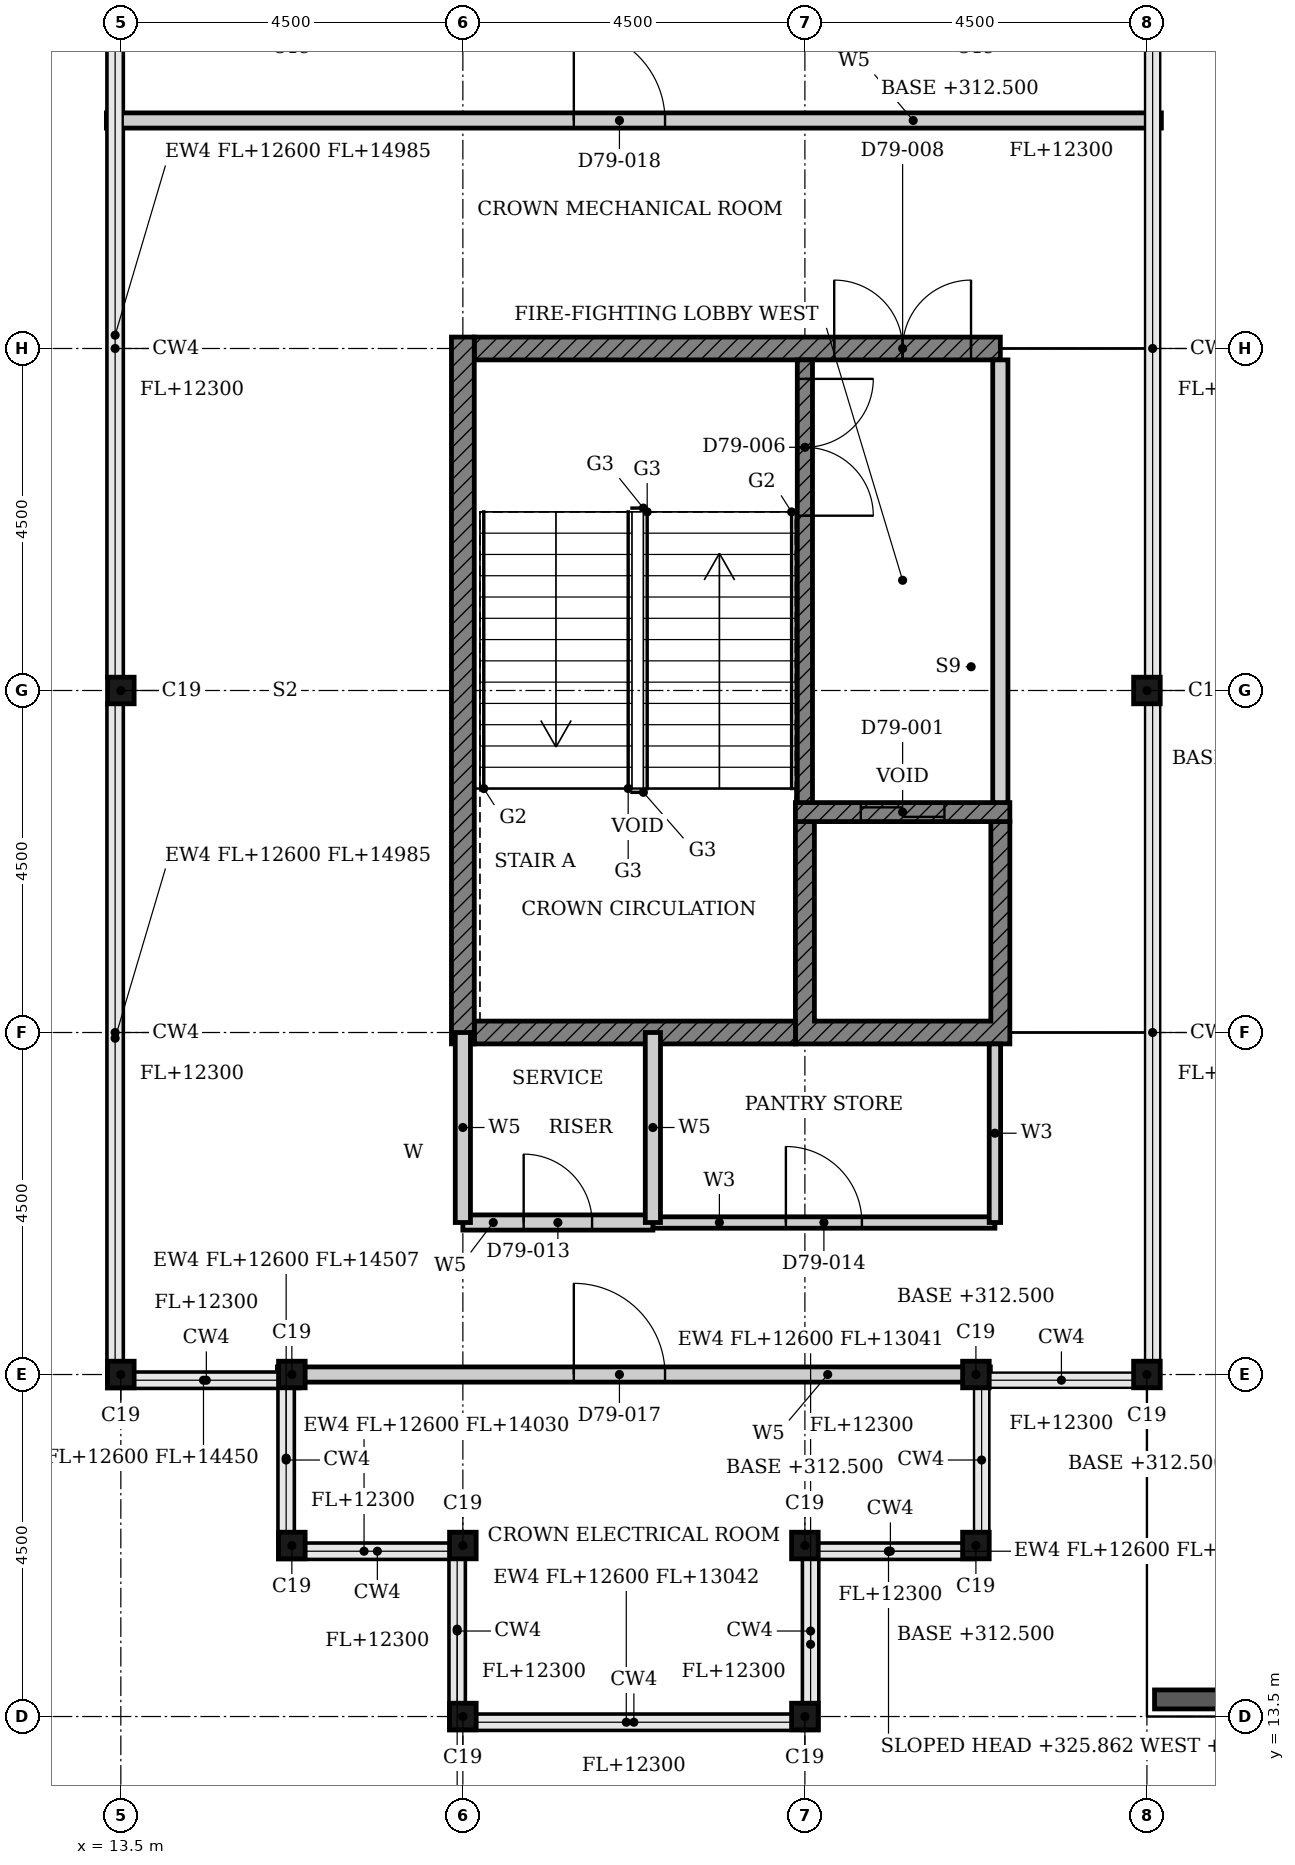
"""IFC4 building model, lengths in metres.
Left out: names, types, materials, properties, quantities, classifications, styles, units other than length and angle.
Written with IfcOpenShell. Run it as: python <this file> out.ifc"""

import sys

from ifc_helpers import new_model, si_unit, direction, frame, frame_2d, origin, origin_2d, place, context, subcontext, project, spatial, polyline, rectangle, i_section, outline, extrude, element, fill, save


model = new_model("IFC4")
c1 = context("Model", 3, precision=1e-05, world=origin(), true_north=direction((0.0, 1.0)))
c2 = subcontext(c1, "Body", "Model", "MODEL_VIEW")
j1 = project(units=[si_unit("LENGTHUNIT", "METRE"), si_unit("PLANEANGLEUNIT", "RADIAN")], contexts=[c1])
p1 = place(None, origin())
s1 = spatial("IfcSite", under=j1, at=p1, CompositionType="ELEMENT")
p2 = place(p1, origin())
s2 = spatial("IfcBuilding", under=s1, at=p2, CompositionType="ELEMENT")
p3 = place(p2, frame((0.0, 0.0, 312.8)))
s3 = spatial("IfcBuildingStorey", under=s2, at=p3, CompositionType="ELEMENT", Elevation=312.8)
for number, where, z_axis, x_axis in (
    (1, (22.5, 13.5, -0.3), (0.0, 0.0, 1.0), (1.0, 0.0, 0.0)),
    (2, (22.5, 15.75, -0.3), (0.0, 0.0, 1.0), (1.0, 0.0, 0.0)),
    (3, (24.75, 15.75, -0.3), (0.0, 0.0, 1.0), (1.0, 0.0, 0.0)),
    (4, (24.75, 18.0, -0.3), (0.0, 0.0, 1.0), (1.0, 0.0, 0.0)),
    (5, (27.0, 18.0, -0.3), (0.0, 0.0, 1.0), (1.0, 0.0, 0.0)),
    (6, (27.0, 27.0, -0.3), (0.0, 0.0, 1.0), (1.0, 0.0, 0.0)),
):
    element("IfcColumn", number, at=place(p3, frame(where, z_axis=z_axis, x_axis=x_axis)), inside=s3, PredefinedType="COLUMN", context=c2, shape_type="SweptSolid", body=[
        extrude(i_section(OverallWidth=0.35, OverallDepth=0.35, WebThickness=0.012, FlangeThickness=0.019, FilletRadius=0.013, at=origin_2d()), origin(), (0.0, 0.0, 1.0), 4.5),
    ])
for number, where, z_axis, x_axis in (
    (7, (13.5, 27.0, 0.0), (0.0, 0.0, 1.0), (1.0, 0.0, 0.0)),
    (8, (13.5, 18.0, 0.0), (0.0, 0.0, 1.0), (1.0, 0.0, 0.0)),
    (9, (15.75, 18.0, 0.0), (0.0, 0.0, 1.0), (1.0, 0.0, 0.0)),
    (10, (15.75, 15.75, 0.0), (0.0, 0.0, 1.0), (1.0, 0.0, 0.0)),
    (11, (18.0, 15.75, 0.0), (0.0, 0.0, 1.0), (1.0, 0.0, 0.0)),
    (12, (18.0, 13.5, 0.0), (0.0, 0.0, 1.0), (1.0, 0.0, 0.0)),
):
    element("IfcColumn", number, at=place(p3, frame(where, z_axis=z_axis, x_axis=x_axis)), inside=s3, PredefinedType="COLUMN", context=c2, shape_type="SweptSolid", body=[
        extrude(i_section(OverallWidth=0.35, OverallDepth=0.35, WebThickness=0.012, FlangeThickness=0.019, FilletRadius=0.013, at=origin_2d()), origin(), (0.0, 0.0, 1.0), 4.2),
    ])
p4 = place(p3, frame((27.1, 13.725, 0.0), z_axis=(0.0, 0.0, 1.0), x_axis=(1.0, 0.0, 0.0)))
e13 = element("IfcWall", 13, at=p4, inside=s3, PredefinedType="PARAPET", context=c2, shape_type="SweptSolid", body=[
    extrude(rectangle(XDim=4.3, YDim=0.25, at=frame_2d((2.15, 0.0))), origin(), (0.0, 0.0, 1.0), 1.1),
])
p5 = place(p3, frame((22.575, 13.325, 12.6), z_axis=(0.0, 0.0, 1.0), x_axis=(0.0, 1.0, 0.0)))
e14 = element("IfcWall", 14, at=p5, inside=s3, PredefinedType="SOLIDWALL", context=c2, shape_type="SweptSolid", body=[
    extrude(rectangle(XDim=2.25, YDim=0.2, at=frame_2d((1.125, 0.0))), origin(), (0.0, 0.0, 1.0), 0.441),
])
p6 = place(p3, frame((22.475, 15.675, 12.6), z_axis=(0.0, 0.0, 1.0), x_axis=(1.0, 0.0, 0.0)))
e15 = element("IfcWall", 15, at=p6, inside=s3, PredefinedType="SOLIDWALL", context=c2, shape_type="SweptSolid", body=[
    extrude(outline(polyline([(0.0, 0.0), (2.25, 0.0), (0.0, 0.462), (0.0, 0.0)])), frame((0.0, 0.1, 0.0), z_axis=(0.0, -1.0, 0.0), x_axis=(1.0, 0.0, 0.0)), (0.0, 0.0, 1.0), 0.2),
])
p7 = place(p3, frame((13.425, 36.175, 12.6), z_axis=(0.0, 0.0, 1.0), x_axis=(0.0, -1.0, 0.0)))
e16 = element("IfcWall", 16, at=p7, inside=s3, PredefinedType="SOLIDWALL", context=c2, shape_type="SweptSolid", body=[
    extrude(rectangle(XDim=9.0, YDim=0.2, at=frame_2d((4.5, 0.0))), origin(), (0.0, 0.0, 1.0), 2.385),
])
p8 = place(p3, frame((13.425, 26.825, 12.6), z_axis=(0.0, 0.0, 1.0), x_axis=(0.0, -1.0, 0.0)))
e17 = element("IfcWall", 17, at=p8, inside=s3, PredefinedType="SOLIDWALL", context=c2, shape_type="SweptSolid", body=[
    extrude(rectangle(XDim=8.8, YDim=0.2, at=frame_2d((4.4, 0.0))), origin(), (0.0, 0.0, 1.0), 2.385),
])
p9 = place(p3, frame((13.325, 17.925, 12.6), z_axis=(0.0, 0.0, 1.0), x_axis=(1.0, 0.0, 0.0)))
e18 = element("IfcWall", 18, at=p9, inside=s3, PredefinedType="SOLIDWALL", context=c2, shape_type="SweptSolid", body=[
    extrude(rectangle(XDim=2.525, YDim=0.2, at=frame_2d((1.263, 0.0))), origin(), (0.0, 0.0, 1.0), 1.85),
])
p10 = place(p3, frame((15.675, 18.025, 12.6), z_axis=(0.0, 0.0, 1.0), x_axis=(0.0, -1.0, 0.0)))
e19 = element("IfcWall", 19, at=p10, inside=s3, PredefinedType="SOLIDWALL", context=c2, shape_type="SweptSolid", body=[
    extrude(rectangle(XDim=2.25, YDim=0.2, at=frame_2d((1.125, 0.0))), origin(), (0.0, 0.0, 1.0), 1.907),
])
p11 = place(p3, frame((15.575, 15.675, 12.6), z_axis=(0.0, 0.0, 1.0), x_axis=(1.0, 0.0, 0.0)))
e20 = element("IfcWall", 20, at=p11, inside=s3, PredefinedType="SOLIDWALL", context=c2, shape_type="SweptSolid", body=[
    extrude(rectangle(XDim=2.25, YDim=0.2, at=frame_2d((1.125, 0.0))), origin(), (0.0, 0.0, 1.0), 1.43),
])
p12 = place(p3, frame((17.925, 15.775, 12.6), z_axis=(0.0, 0.0, 1.0), x_axis=(0.0, -1.0, 0.0)))
e21 = element("IfcWall", 21, at=p12, inside=s3, PredefinedType="SOLIDWALL", context=c2, shape_type="SweptSolid", body=[
    extrude(rectangle(XDim=2.25, YDim=0.2, at=frame_2d((1.125, 0.0))), origin(), (0.0, 0.0, 1.0), 1.429),
])
p13 = place(p3, frame((17.825, 13.425, 12.6), z_axis=(0.0, 0.0, 1.0), x_axis=(1.0, 0.0, 0.0)))
e22 = element("IfcWall", 22, at=p13, inside=s3, PredefinedType="SOLIDWALL", context=c2, shape_type="SweptSolid", body=[
    extrude(rectangle(XDim=4.65, YDim=0.2, at=frame_2d((2.325, 0.0))), origin(), (0.0, 0.0, 1.0), 0.442),
])
p14 = place(p3, origin())
e23 = element("IfcWall", 23, at=p14, inside=s3, PredefinedType="SHEAR", context=c2, shape_type="SweptSolid", body=[
    extrude(outline(polyline([(22.375, 22.35), (25.197, 22.35), (25.197, 25.275), (24.947, 25.275), (24.947, 22.65), (22.625, 22.65), (22.625, 25.275), (22.375, 25.275), (22.375, 22.35)])), origin(), (0.0, 0.0, 1.0), 3.9),
])
p15 = place(p3, frame((18.15, 22.5, 0.0), z_axis=(0.0, 0.0, 1.0), x_axis=(1.0, 0.0, 0.0)))
e24 = element("IfcWall", 24, at=p15, inside=s3, PredefinedType="SHEAR", context=c2, shape_type="SweptSolid", body=[
    extrude(rectangle(XDim=4.225, YDim=0.3, at=frame_2d((2.113, 0.0))), origin(), (0.0, 0.0, 1.0), 3.2),
])
p16 = place(p3, frame((18.15, 31.5, 0.0), z_axis=(0.0, 0.0, 1.0), x_axis=(1.0, 0.0, 0.0)))
e25 = element("IfcWall", 25, at=p16, inside=s3, PredefinedType="SHEAR", context=c2, shape_type="SweptSolid", body=[
    extrude(rectangle(XDim=6.922, YDim=0.3, at=frame_2d((3.461, 0.0))), origin(), (0.0, 0.0, 1.0), 3.2),
])
p17 = place(p16, frame((4.736, 0.0, 0.0)))
e26 = element("IfcOpeningElement", 26, at=p17, cuts=e25, PredefinedType="OPENING", context=c2, shape_type="SweptSolid", body=[
    extrude(rectangle(XDim=1.8, YDim=2.1, at=frame_2d((0.9, 1.05))), frame((0.0, 0.16, 0.0), z_axis=(0.0, -1.0, 0.0), x_axis=(1.0, 0.0, 0.0)), (0.0, 0.0, 1.0), 0.32),
])
p18 = place(p3, frame((18.0, 22.35, 0.0), z_axis=(0.0, 0.0, 1.0), x_axis=(0.0, 1.0, 0.0)))
e27 = element("IfcWall", 27, at=p18, inside=s3, PredefinedType="SHEAR", context=c2, shape_type="SweptSolid", body=[
    extrude(rectangle(XDim=9.3, YDim=0.3, at=frame_2d((4.65, 0.0))), origin(), (0.0, 0.0, 1.0), 3.9),
])
p19 = place(p3, frame((22.375, 25.4, 0.0), z_axis=(0.0, 0.0, 1.0), x_axis=(1.0, 0.0, 0.0)))
e28 = element("IfcWall", 28, at=p19, inside=s3, PredefinedType="SHEAR", context=c2, shape_type="SweptSolid", body=[
    extrude(rectangle(XDim=2.822, YDim=0.25, at=frame_2d((1.411, 0.0))), origin(), (0.0, 0.0, 1.0), 3.9),
])
p20 = place(p19, frame((0.861, 0.0, 0.0)))
e29 = element("IfcOpeningElement", 29, at=p20, cuts=e28, PredefinedType="OPENING", context=c2, shape_type="SweptSolid", body=[
    extrude(rectangle(XDim=1.1, YDim=2.1, at=frame_2d((0.55, 1.05))), frame((0.0, 0.135, 0.0), z_axis=(0.0, -1.0, 0.0), x_axis=(1.0, 0.0, 0.0)), (0.0, 0.0, 1.0), 0.27),
])
p21 = place(p3, frame((22.5, 31.35, 0.0), z_axis=(0.0, 0.0, 1.0), x_axis=(0.0, -1.0, 0.0)))
e30 = element("IfcWall", 30, at=p21, inside=s3, PredefinedType="SHEAR", context=c2, shape_type="SweptSolid", body=[
    extrude(rectangle(XDim=5.825, YDim=0.2, at=frame_2d((2.913, 0.0))), origin(), (0.0, 0.0, 1.0), 3.9),
])
p22 = place(p21, frame((0.25, 0.0, 0.0)))
e31 = element("IfcOpeningElement", 31, at=p22, cuts=e30, PredefinedType="OPENING", context=c2, shape_type="SweptSolid", body=[
    extrude(rectangle(XDim=1.8, YDim=2.1, at=frame_2d((0.9, 1.05))), frame((0.0, 0.11, 0.0), z_axis=(0.0, -1.0, 0.0), x_axis=(1.0, 0.0, 0.0)), (0.0, 0.0, 1.0), 0.22),
])
p23 = place(p3, frame((25.072, 25.525, 0.0), z_axis=(0.0, 0.0, 1.0), x_axis=(0.0, 1.0, 0.0)))
e32 = element("IfcWall", 32, at=p23, inside=s3, PredefinedType="PARTITIONING", context=c2, shape_type="SweptSolid", body=[
    extrude(rectangle(XDim=5.825, YDim=0.2, at=frame_2d((2.913, 0.0))), origin(), (0.0, 0.0, 1.0), 3.9),
])
p24 = place(p3, frame((20.5, 20.0, 0.0), z_axis=(0.0, 0.0, 1.0), x_axis=(1.0, 0.0, 0.0)))
e33 = element("IfcWall", 33, at=p24, inside=s3, PredefinedType="PARTITIONING", context=c2, shape_type="SweptSolid", body=[
    extrude(rectangle(XDim=4.5, YDim=0.15, at=frame_2d((2.25, 0.0))), origin(), (0.0, 0.0, 1.0), 3.9),
])
p25 = place(p24, frame((1.75, 0.0, 0.0)))
e34 = element("IfcOpeningElement", 34, at=p25, cuts=e33, PredefinedType="OPENING", context=c2, shape_type="SweptSolid", body=[
    extrude(rectangle(XDim=1.0, YDim=2.1, at=frame_2d((0.5, 1.05))), frame((0.0, 0.085, 0.0), z_axis=(0.0, -1.0, 0.0), x_axis=(1.0, 0.0, 0.0)), (0.0, 0.0, 1.0), 0.17),
])
p26 = place(p3, frame((25.0, 20.0, 0.0), z_axis=(0.0, 0.0, 1.0), x_axis=(0.0, 1.0, 0.0)))
e35 = element("IfcWall", 35, at=p26, inside=s3, PredefinedType="PARTITIONING", context=c2, shape_type="SweptSolid", body=[
    extrude(rectangle(XDim=2.35, YDim=0.15, at=frame_2d((1.175, 0.0))), origin(), (0.0, 0.0, 1.0), 3.9),
])
p27 = place(p3, frame((15.56, 18.0, 0.0), z_axis=(0.0, 0.0, 1.0), x_axis=(1.0, 0.0, 0.0)))
e36 = element("IfcWall", 36, at=p27, inside=s3, PredefinedType="PARTITIONING", context=c2, shape_type="SweptSolid", body=[
    extrude(rectangle(XDim=9.38, YDim=0.2, at=frame_2d((4.69, 0.0))), origin(), (0.0, 0.0, 1.0), 3.18),
])
p28 = place(p27, frame((3.9, 0.0, 0.0)))
e37 = element("IfcOpeningElement", 37, at=p28, cuts=e36, PredefinedType="OPENING", context=c2, shape_type="SweptSolid", body=[
    extrude(rectangle(XDim=1.2, YDim=2.1, at=frame_2d((0.6, 1.05))), frame((0.0, 0.11, 0.0), z_axis=(0.0, -1.0, 0.0), x_axis=(1.0, 0.0, 0.0)), (0.0, 0.0, 1.0), 0.22),
])
p29 = place(p3, frame((18.0, 20.0, 0.0), z_axis=(0.0, 0.0, 1.0), x_axis=(1.0, 0.0, 0.0)))
e38 = element("IfcWall", 38, at=p29, inside=s3, PredefinedType="PARTITIONING", context=c2, shape_type="SweptSolid", body=[
    extrude(rectangle(XDim=2.5, YDim=0.2, at=frame_2d((1.25, 0.0))), origin(), (0.0, 0.0, 1.0), 3.9),
])
p30 = place(p29, frame((0.8, 0.0, 0.0)))
e39 = element("IfcOpeningElement", 39, at=p30, cuts=e38, PredefinedType="OPENING", context=c2, shape_type="SweptSolid", body=[
    extrude(rectangle(XDim=0.9, YDim=2.1, at=frame_2d((0.45, 1.05))), frame((0.0, 0.11, 0.0), z_axis=(0.0, -1.0, 0.0), x_axis=(1.0, 0.0, 0.0)), (0.0, 0.0, 1.0), 0.22),
])
p31 = place(p3, frame((13.31, 34.5, 0.0), z_axis=(0.0, 0.0, 1.0), x_axis=(1.0, 0.0, 0.0)))
e40 = element("IfcWall", 40, at=p31, inside=s3, PredefinedType="PARTITIONING", context=c2, shape_type="SweptSolid", body=[
    extrude(rectangle(XDim=13.88, YDim=0.2, at=frame_2d((6.94, 0.0))), origin(), (0.0, 0.0, 1.0), 3.9),
])
p32 = place(p31, frame((6.15, 0.0, 0.0)))
e41 = element("IfcOpeningElement", 41, at=p32, cuts=e40, PredefinedType="OPENING", context=c2, shape_type="SweptSolid", body=[
    extrude(rectangle(XDim=1.2, YDim=2.1, at=frame_2d((0.6, 1.05))), frame((0.0, 0.11, 0.0), z_axis=(0.0, -1.0, 0.0), x_axis=(1.0, 0.0, 0.0)), (0.0, 0.0, 1.0), 0.22),
])
for number, where, z_axis, x_axis in (
    (42, (18.0, 20.0, 0.0), (0.0, 0.0, 1.0), (0.0, 1.0, 0.0)),
    (43, (20.5, 20.0, 0.0), (0.0, 0.0, 1.0), (0.0, 1.0, 0.0)),
):
    element("IfcWall", number, at=place(p3, frame(where, z_axis=z_axis, x_axis=x_axis)), inside=s3, PredefinedType="PARTITIONING", context=c2, shape_type="SweptSolid", body=[
        extrude(rectangle(XDim=2.5, YDim=0.2, at=frame_2d((1.25, 0.0))), origin(), (0.0, 0.0, 1.0), 3.9),
    ])
p33 = place(p20, origin())
e44 = element("IfcDoor", 44, at=p33, inside=s3, OperationType="DOUBLE_DOOR_SLIDING", PredefinedType="DOOR", context=c2, shape_type="SweptSolid", body=[
    extrude(rectangle(XDim=1.1, YDim=2.1, at=frame_2d((0.55, 1.05))), frame((0.0, 0.025, 0.0), z_axis=(0.0, -1.0, 0.0), x_axis=(1.0, 0.0, 0.0)), (0.0, 0.0, 1.0), 0.05),
])
fill(e29, e44)
p34 = place(p22, origin())
e45 = element("IfcDoor", 45, at=p34, inside=s3, OperationType="DOUBLE_DOOR_SINGLE_SWING", PredefinedType="DOOR", context=c2, shape_type="SweptSolid", body=[
    extrude(rectangle(XDim=1.8, YDim=2.1, at=frame_2d((0.9, 1.05))), frame((0.0, 0.025, 0.0), z_axis=(0.0, -1.0, 0.0), x_axis=(1.0, 0.0, 0.0)), (0.0, 0.0, 1.0), 0.05),
])
fill(e31, e45)
p35 = place(p17, origin())
e46 = element("IfcDoor", 46, at=p35, inside=s3, OperationType="DOUBLE_DOOR_SINGLE_SWING", PredefinedType="DOOR", context=c2, shape_type="SweptSolid", body=[
    extrude(rectangle(XDim=1.8, YDim=2.1, at=frame_2d((0.9, 1.05))), frame((0.0, 0.025, 0.0), z_axis=(0.0, -1.0, 0.0), x_axis=(1.0, 0.0, 0.0)), (0.0, 0.0, 1.0), 0.05),
])
fill(e26, e46)
p36 = place(p30, origin())
e47 = element("IfcDoor", 47, at=p36, inside=s3, OperationType="SINGLE_SWING_RIGHT", PredefinedType="DOOR", context=c2, shape_type="SweptSolid", body=[
    extrude(rectangle(XDim=0.9, YDim=2.1, at=frame_2d((0.45, 1.05))), frame((0.0, 0.025, 0.0), z_axis=(0.0, -1.0, 0.0), x_axis=(1.0, 0.0, 0.0)), (0.0, 0.0, 1.0), 0.05),
])
fill(e39, e47)
p37 = place(p25, origin())
e48 = element("IfcDoor", 48, at=p37, inside=s3, OperationType="SINGLE_SWING_LEFT", PredefinedType="DOOR", context=c2, shape_type="SweptSolid", body=[
    extrude(rectangle(XDim=1.0, YDim=2.1, at=frame_2d((0.5, 1.05))), frame((0.0, 0.025, 0.0), z_axis=(0.0, -1.0, 0.0), x_axis=(1.0, 0.0, 0.0)), (0.0, 0.0, 1.0), 0.05),
])
fill(e34, e48)
p38 = place(p28, origin())
e49 = element("IfcDoor", 49, at=p38, inside=s3, OperationType="SINGLE_SWING_LEFT", PredefinedType="DOOR", context=c2, shape_type="SweptSolid", body=[
    extrude(rectangle(XDim=1.2, YDim=2.1, at=frame_2d((0.6, 1.05))), frame((0.0, 0.025, 0.0), z_axis=(0.0, -1.0, 0.0), x_axis=(1.0, 0.0, 0.0)), (0.0, 0.0, 1.0), 0.05),
])
fill(e37, e49)
p39 = place(p32, origin())
e50 = element("IfcDoor", 50, at=p39, inside=s3, OperationType="SINGLE_SWING_LEFT", PredefinedType="DOOR", context=c2, shape_type="SweptSolid", body=[
    extrude(rectangle(XDim=1.2, YDim=2.1, at=frame_2d((0.6, 1.05))), frame((0.0, 0.025, 0.0), z_axis=(0.0, -1.0, 0.0), x_axis=(1.0, 0.0, 0.0)), (0.0, 0.0, 1.0), 0.05),
])
fill(e41, e50)
save(model, sys.argv[1])
